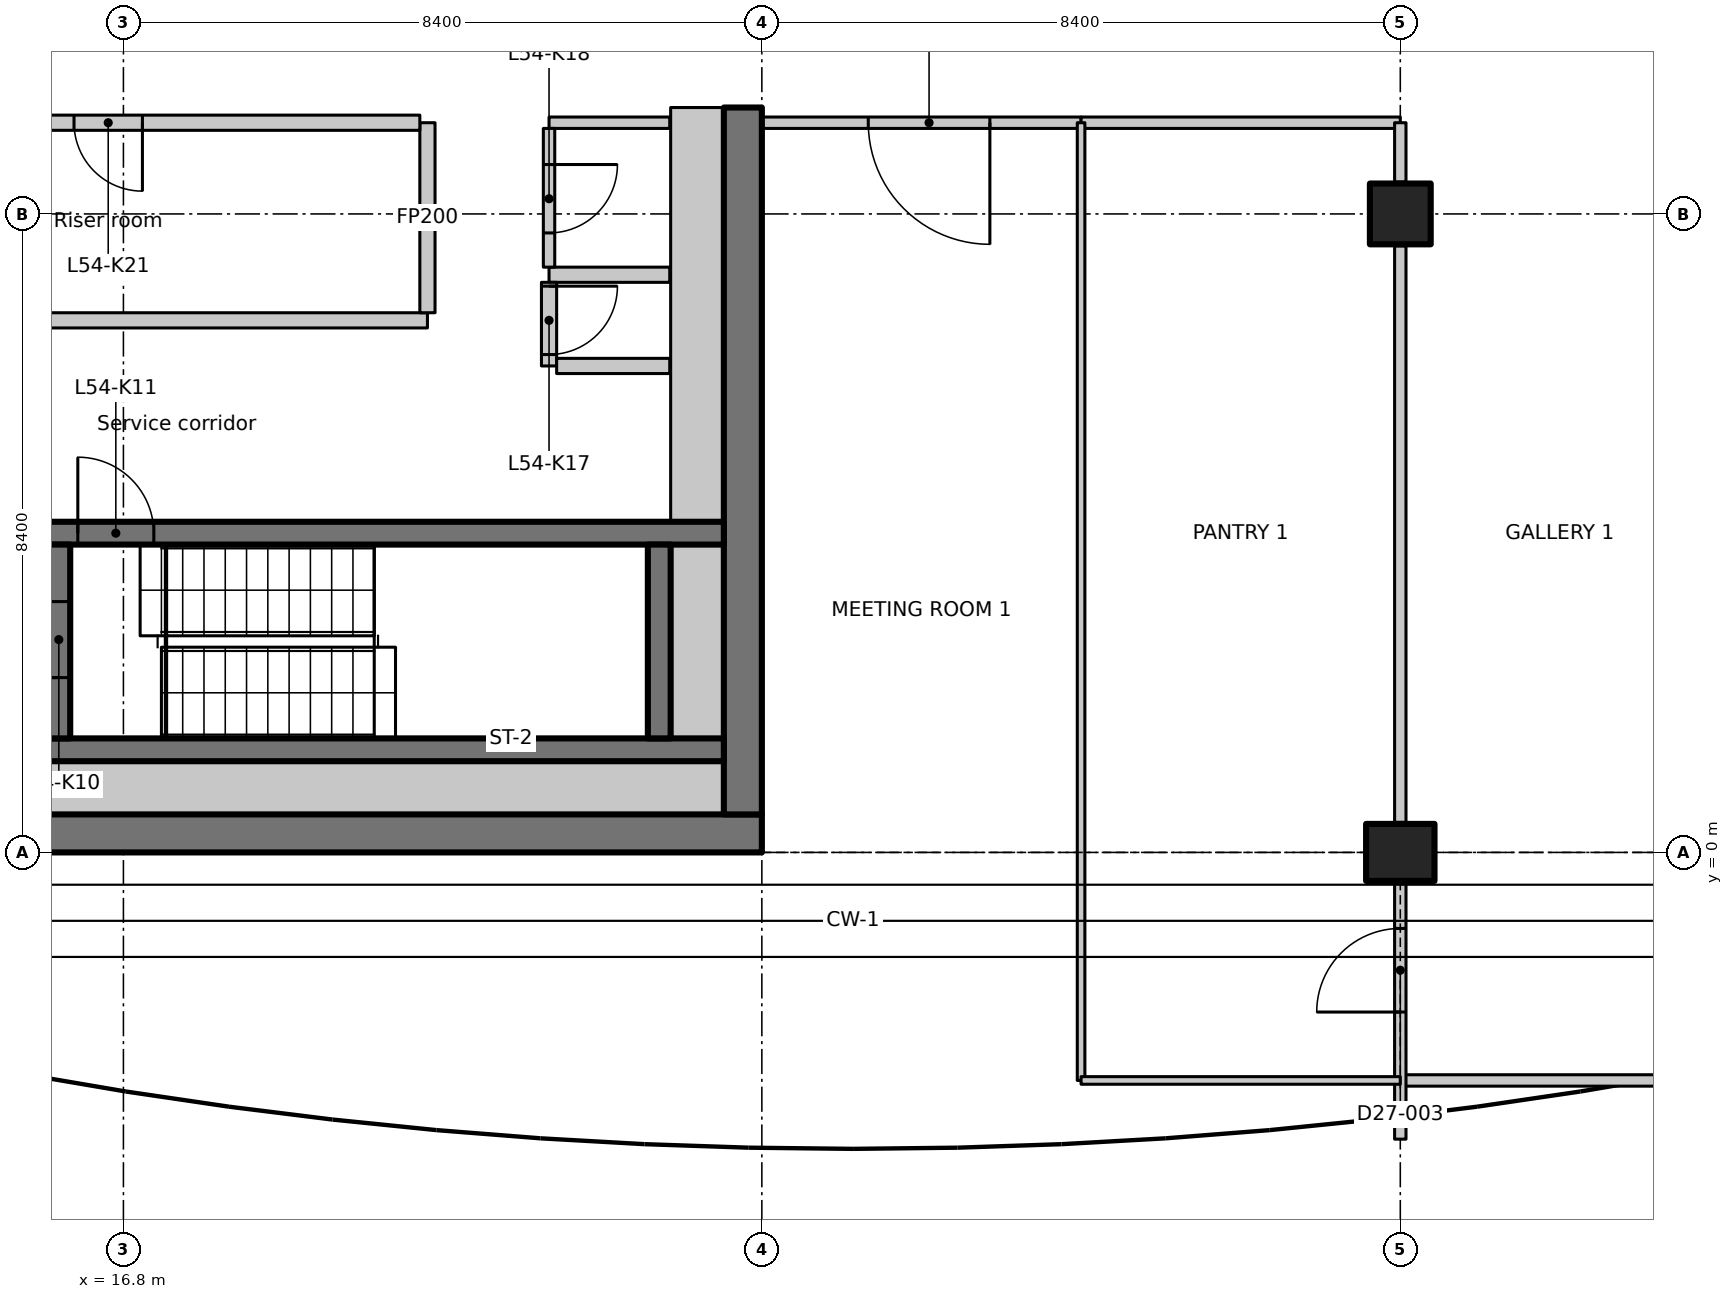
"""IFC4 building model, lengths in metres.
Left out: names, types, materials, properties, quantities, classifications, styles, units other than length and angle.
Written with IfcOpenShell. Run it as: python <this file> out.ifc"""

import sys

from ifc_helpers import new_model, si_unit, direction, frame, frame_2d, origin, origin_2d, place, context, subcontext, project, spatial, polyline, rectangle, outline, extrude, element, fill, save


model = new_model("IFC4")
c1 = context("Model", 3, precision=1e-05, world=origin(), true_north=direction((0.0, 1.0)))
c2 = subcontext(c1, "Body", "Model", "MODEL_VIEW")
j1 = project(units=[si_unit("LENGTHUNIT", "METRE"), si_unit("PLANEANGLEUNIT", "RADIAN")], contexts=[c1])
p1 = place(None, origin())
s1 = spatial("IfcSite", under=j1, at=p1, CompositionType="ELEMENT")
p2 = place(p1, origin())
s2 = spatial("IfcBuilding", under=s1, at=p2, CompositionType="ELEMENT")
p3 = place(p2, frame((0.0, 0.0, 215.7)))
s3 = spatial("IfcBuildingStorey", under=s2, at=p3, CompositionType="ELEMENT", Elevation=215.7)
p4 = place(p3, frame((33.6, 0.0, 0.0), z_axis=(0.0, 0.0, 1.0), x_axis=(0.0, 1.0, 0.0)))
e1 = element("IfcColumn", 1, at=p4, inside=s3, PredefinedType="COLUMN", context=c2, shape_type="SweptSolid", body=[
    extrude(rectangle(XDim=0.75, YDim=0.9, at=origin_2d()), origin(), (0.0, 0.0, 1.0), 3.35),
])
p5 = place(p3, frame((33.6, 8.4, 0.0), z_axis=(0.0, 0.0, 1.0), x_axis=(1.0, 0.0, 0.0)))
e2 = element("IfcColumn", 2, at=p5, inside=s3, PredefinedType="COLUMN", context=c2, shape_type="SweptSolid", body=[
    extrude(rectangle(XDim=0.8, YDim=0.8, at=origin_2d()), origin(), (0.0, 0.0, 1.0), 3.35),
])
p6 = place(p3, frame((7.436, 0.25, 0.0), z_axis=(0.0, 0.0, 1.0), x_axis=(1.0, 0.0, 0.0)))
e3 = element("IfcWall", 3, at=p6, inside=s3, PredefinedType="SHEAR", context=c2, shape_type="SweptSolid", body=[
    extrude(rectangle(XDim=17.764, YDim=0.5, at=frame_2d((8.882, 0.0))), origin(), (0.0, 0.0, 1.0), 3.35),
])
p7 = place(p3, frame((24.95, 0.5, 0.0), z_axis=(0.0, 0.0, 1.0), x_axis=(0.0, 1.0, 0.0)))
e4 = element("IfcWall", 4, at=p7, inside=s3, PredefinedType="SHEAR", context=c2, shape_type="SweptSolid", body=[
    extrude(rectangle(XDim=9.3, YDim=0.5, at=frame_2d((4.65, 0.0))), origin(), (0.0, 0.0, 1.0), 3.35),
])
p8 = place(p3, frame((15.8, 1.35, 0.0), z_axis=(0.0, 0.0, 1.0), x_axis=(1.0, 0.0, 0.0)))
e5 = element("IfcWall", 5, at=p8, inside=s3, PredefinedType="SHEAR", context=c2, shape_type="SweptSolid", body=[
    extrude(rectangle(XDim=8.9, YDim=0.3, at=frame_2d((4.45, 0.0))), origin(), (0.0, 0.0, 1.0), 3.35),
])
p9 = place(p3, frame((15.8, 4.2, 0.0), z_axis=(0.0, 0.0, 1.0), x_axis=(1.0, 0.0, 0.0)))
e6 = element("IfcWall", 6, at=p9, inside=s3, PredefinedType="SHEAR", context=c2, shape_type="SweptSolid", body=[
    extrude(rectangle(XDim=8.9, YDim=0.3, at=frame_2d((4.45, 0.0))), origin(), (0.0, 0.0, 1.0), 3.35),
])
p10 = place(p9, frame((0.4, 0.0, 0.0)))
e7 = element("IfcOpeningElement", 7, at=p10, cuts=e6, PredefinedType="OPENING", context=c2, shape_type="SweptSolid", body=[
    extrude(rectangle(XDim=1.0, YDim=2.1, at=frame_2d((0.5, 1.05))), frame((0.0, 0.16, 0.0), z_axis=(0.0, -1.0, 0.0), x_axis=(1.0, 0.0, 0.0)), (0.0, 0.0, 1.0), 0.32),
])
p11 = place(p3, frame((15.95, 1.5, 0.0), z_axis=(0.0, 0.0, 1.0), x_axis=(0.0, 1.0, 0.0)))
e8 = element("IfcWall", 8, at=p11, inside=s3, PredefinedType="SHEAR", context=c2, shape_type="SweptSolid", body=[
    extrude(rectangle(XDim=2.55, YDim=0.3, at=frame_2d((1.275, 0.0))), origin(), (0.0, 0.0, 1.0), 3.35),
])
p12 = place(p11, frame((0.8, 0.0, 0.0)))
e9 = element("IfcOpeningElement", 9, at=p12, cuts=e8, PredefinedType="OPENING", context=c2, shape_type="SweptSolid", body=[
    extrude(rectangle(XDim=1.0, YDim=2.1, at=frame_2d((0.5, 1.05))), frame((0.0, 0.16, 0.0), z_axis=(0.0, -1.0, 0.0), x_axis=(1.0, 0.0, 0.0)), (0.0, 0.0, 1.0), 0.32),
])
p13 = place(p3, frame((23.85, 1.5, 0.0), z_axis=(0.0, 0.0, 1.0), x_axis=(0.0, 1.0, 0.0)))
e10 = element("IfcWall", 10, at=p13, inside=s3, PredefinedType="SHEAR", context=c2, shape_type="SweptSolid", body=[
    extrude(rectangle(XDim=2.55, YDim=0.3, at=frame_2d((1.275, 0.0))), origin(), (0.0, 0.0, 1.0), 3.35),
])
p14 = place(p3, frame((12.4, 7.0, 0.0), z_axis=(0.0, 0.0, 1.0), x_axis=(1.0, 0.0, 0.0)))
e11 = element("IfcWall", 11, at=p14, inside=s3, PredefinedType="PARTITIONING", context=c2, shape_type="SweptSolid", body=[
    extrude(rectangle(XDim=8.4, YDim=0.2, at=frame_2d((4.2, 0.0))), origin(), (0.0, 0.0, 1.0), 3.35),
])
p15 = place(p3, frame((20.8, 7.1, 0.0), z_axis=(0.0, 0.0, 1.0), x_axis=(0.0, 1.0, 0.0)))
e12 = element("IfcWall", 12, at=p15, inside=s3, PredefinedType="PARTITIONING", context=c2, shape_type="SweptSolid", body=[
    extrude(rectangle(XDim=2.5, YDim=0.2, at=frame_2d((1.25, 0.0))), origin(), (0.0, 0.0, 1.0), 3.35),
])
p16 = place(p3, frame((20.7, 9.6, 0.0), z_axis=(0.0, 0.0, 1.0), x_axis=(-1.0, 0.0, 0.0)))
e13 = element("IfcWall", 13, at=p16, inside=s3, PredefinedType="PARTITIONING", context=c2, shape_type="SweptSolid", body=[
    extrude(rectangle(XDim=8.3, YDim=0.2, at=frame_2d((4.15, 0.0))), origin(), (0.0, 0.0, 1.0), 3.35),
])
p17 = place(p16, frame((3.65, 0.0, 0.0)))
e14 = element("IfcOpeningElement", 14, at=p17, cuts=e13, PredefinedType="OPENING", context=c2, shape_type="SweptSolid", body=[
    extrude(rectangle(XDim=0.9, YDim=2.1, at=frame_2d((0.45, 1.05))), frame((0.0, 0.11, 0.0), z_axis=(0.0, -1.0, 0.0), x_axis=(1.0, 0.0, 0.0)), (0.0, 0.0, 1.0), 0.22),
])
p18 = place(p3, frame((23.988, 7.6, 0.0), z_axis=(0.0, 0.0, 1.0), x_axis=(-1.0, 0.0, 0.0)))
e15 = element("IfcWall", 15, at=p18, inside=s3, PredefinedType="PARTITIONING", context=c2, shape_type="SweptSolid", body=[
    extrude(rectangle(XDim=1.588, YDim=0.2, at=frame_2d((0.794, 0.0))), origin(), (0.0, 0.0, 1.0), 3.35),
])
p19 = place(p3, frame((22.4, 7.5, 0.0), z_axis=(0.0, 0.0, 1.0), x_axis=(0.0, -1.0, 0.0)))
e16 = element("IfcWall", 16, at=p19, inside=s3, PredefinedType="PARTITIONING", context=c2, shape_type="SweptSolid", body=[
    extrude(rectangle(XDim=1.1, YDim=0.2, at=frame_2d((0.55, 0.0))), origin(), (0.0, 0.0, 1.0), 3.35),
])
p20 = place(p19, frame((0.05, 0.0, 0.0)))
e17 = element("IfcOpeningElement", 17, at=p20, cuts=e16, PredefinedType="OPENING", context=c2, shape_type="SweptSolid", body=[
    extrude(rectangle(XDim=0.9, YDim=2.1, at=frame_2d((0.45, 1.05))), frame((0.0, 0.11, 0.0), z_axis=(0.0, -1.0, 0.0), x_axis=(1.0, 0.0, 0.0)), (0.0, 0.0, 1.0), 0.22),
])
p21 = place(p3, frame((22.5, 6.4, 0.0), z_axis=(0.0, 0.0, 1.0), x_axis=(1.0, 0.0, 0.0)))
e18 = element("IfcWall", 18, at=p21, inside=s3, PredefinedType="PARTITIONING", context=c2, shape_type="SweptSolid", body=[
    extrude(rectangle(XDim=1.488, YDim=0.2, at=frame_2d((0.744, 0.0))), origin(), (0.0, 0.0, 1.0), 3.35),
])
p22 = place(p3, frame((23.988, 9.6, 0.0), z_axis=(0.0, 0.0, 1.0), x_axis=(-1.0, 0.0, 0.0)))
e19 = element("IfcWall", 19, at=p22, inside=s3, PredefinedType="PARTITIONING", context=c2, shape_type="SweptSolid", body=[
    extrude(rectangle(XDim=1.588, YDim=0.15, at=frame_2d((0.794, 0.0))), origin(), (0.0, 0.0, 1.0), 3.35),
])
p23 = place(p3, frame((22.4, 9.525, 0.0), z_axis=(0.0, 0.0, 1.0), x_axis=(0.0, -1.0, 0.0)))
e20 = element("IfcWall", 20, at=p23, inside=s3, PredefinedType="PARTITIONING", context=c2, shape_type="SweptSolid", body=[
    extrude(rectangle(XDim=1.825, YDim=0.15, at=frame_2d((0.913, 0.0))), origin(), (0.0, 0.0, 1.0), 3.35),
])
p24 = place(p23, frame((0.475, 0.0, 0.0)))
e21 = element("IfcOpeningElement", 21, at=p24, cuts=e20, PredefinedType="OPENING", context=c2, shape_type="SweptSolid", body=[
    extrude(rectangle(XDim=0.9, YDim=2.1, at=frame_2d((0.45, 1.05))), frame((0.0, 0.085, 0.0), z_axis=(0.0, -1.0, 0.0), x_axis=(1.0, 0.0, 0.0)), (0.0, 0.0, 1.0), 0.17),
])
p25 = place(p3, frame((13.35, 0.85, 0.0), z_axis=(0.0, 0.0, 1.0), x_axis=(1.0, 0.0, 0.0)))
e22 = element("IfcWall", 22, at=p25, inside=s3, PredefinedType="PARTITIONING", context=c2, shape_type="SweptSolid", body=[
    extrude(rectangle(XDim=11.35, YDim=0.7, at=frame_2d((5.675, 0.0))), origin(), (0.0, 0.0, 1.0), 3.35),
])
p26 = place(p3, frame((24.35, 1.5, 0.0), z_axis=(0.0, 0.0, 1.0), x_axis=(0.0, 1.0, 0.0)))
e23 = element("IfcWall", 23, at=p26, inside=s3, PredefinedType="PARTITIONING", context=c2, shape_type="SweptSolid", body=[
    extrude(rectangle(XDim=2.55, YDim=0.7, at=frame_2d((1.275, 0.0))), origin(), (0.0, 0.0, 1.0), 3.35),
])
p27 = place(p3, frame((24.35, 4.35, 0.0), z_axis=(0.0, 0.0, 1.0), x_axis=(0.0, 1.0, 0.0)))
e24 = element("IfcWall", 24, at=p27, inside=s3, PredefinedType="PARTITIONING", context=c2, shape_type="SweptSolid", body=[
    extrude(rectangle(XDim=5.45, YDim=0.7, at=frame_2d((2.725, 0.0))), origin(), (0.0, 0.0, 1.0), 3.35),
])
p28 = place(p3, frame((29.4, 9.6, 0.0), z_axis=(0.0, 0.0, 1.0), x_axis=(-1.0, 0.0, 0.0)))
e25 = element("IfcWall", 25, at=p28, inside=s3, PredefinedType="PARTITIONING", context=c2, shape_type="SweptSolid", body=[
    extrude(rectangle(XDim=4.2, YDim=0.15, at=frame_2d((2.1, 0.0))), origin(), (0.0, 0.0, 1.0), 3.33),
])
p29 = place(p28, frame((1.2, 0.0, 0.0)))
e26 = element("IfcOpeningElement", 26, at=p29, cuts=e25, PredefinedType="OPENING", context=c2, shape_type="SweptSolid", body=[
    extrude(rectangle(XDim=1.6, YDim=2.1, at=frame_2d((0.8, 1.05))), frame((0.0, 0.085, 0.0), z_axis=(0.0, -1.0, 0.0), x_axis=(1.0, 0.0, 0.0)), (0.0, 0.0, 1.0), 0.17),
])
p30 = place(p3, frame((33.6, 9.6, 0.0), z_axis=(0.0, 0.0, 1.0), x_axis=(-1.0, 0.0, 0.0)))
e27 = element("IfcWall", 27, at=p30, inside=s3, PredefinedType="PARTITIONING", context=c2, shape_type="SweptSolid", body=[
    extrude(rectangle(XDim=4.2, YDim=0.15, at=frame_2d((2.1, 0.0))), origin(), (0.0, 0.0, 1.0), 3.33),
])
p31 = place(p3, frame((37.831, -3.0, 0.0), z_axis=(0.0, 0.0, 1.0), x_axis=(-1.0, 0.0, 0.0)))
e28 = element("IfcWall", 28, at=p31, inside=s3, PredefinedType="PARTITIONING", context=c2, shape_type="SweptSolid", body=[
    extrude(rectangle(XDim=4.231, YDim=0.15, at=frame_2d((2.115, 0.0))), origin(), (0.0, 0.0, 1.0), 2.98),
])
p32 = place(p3, frame((33.6, -3.772, 0.0), z_axis=(0.0, 0.0, 1.0), x_axis=(0.0, 1.0, 0.0)))
e29 = element("IfcWall", 29, at=p32, inside=s3, PredefinedType="PARTITIONING", context=c2, shape_type="SweptSolid", body=[
    extrude(rectangle(XDim=3.377, YDim=0.15, at=frame_2d((1.688, 0.0))), origin(), (0.0, 0.0, 1.0), 2.98),
])
p33 = place(p32, frame((1.672, 0.0, 0.0)))
e30 = element("IfcOpeningElement", 30, at=p33, cuts=e29, PredefinedType="OPENING", context=c2, shape_type="SweptSolid", body=[
    extrude(rectangle(XDim=1.1, YDim=2.1, at=frame_2d((0.55, 1.05))), frame((0.0, 0.085, 0.0), z_axis=(0.0, -1.0, 0.0), x_axis=(1.0, 0.0, 0.0)), (0.0, 0.0, 1.0), 0.17),
])
p34 = place(p3, frame((33.6, 0.395, 0.0), z_axis=(0.0, 0.0, 1.0), x_axis=(0.0, 1.0, 0.0)))
e31 = element("IfcWall", 31, at=p34, inside=s3, PredefinedType="PARTITIONING", context=c2, shape_type="SweptSolid", body=[
    extrude(outline(polyline([(0.0, 0.0), (7.585, 0.0), (7.585, 3.33), (0.055, 3.33), (0.053, 2.98), (0.0, 2.98), (0.0, 0.0)])), frame((0.0, 0.075, 0.0), z_axis=(0.0, -1.0, 0.0), x_axis=(1.0, 0.0, 0.0)), (0.0, 0.0, 1.0), 0.15),
])
p35 = place(p3, frame((33.6, 8.82, 0.0), z_axis=(0.0, 0.0, 1.0), x_axis=(0.0, 1.0, 0.0)))
e32 = element("IfcWall", 32, at=p35, inside=s3, PredefinedType="PARTITIONING", context=c2, shape_type="SweptSolid", body=[
    extrude(rectangle(XDim=0.78, YDim=0.15, at=frame_2d((0.39, 0.0))), origin(), (0.0, 0.0, 1.0), 3.33),
])
p36 = place(p3, frame((29.4, 9.6, 0.0), z_axis=(0.0, 0.0, 1.0), x_axis=(0.0, -1.0, 0.0)))
e33 = element("IfcWall", 33, at=p36, inside=s3, PredefinedType="PARTITIONING", context=c2, shape_type="SweptSolid", body=[
    extrude(outline(polyline([(0.0, 0.0), (12.6, 0.0), (12.6, 3.33), (10.05, 3.33), (10.048, 2.98), (9.152, 2.98), (9.15, 3.33), (0.0, 3.33), (0.0, 0.0)])), frame((0.0, 0.05, 0.0), z_axis=(0.0, -1.0, 0.0), x_axis=(1.0, 0.0, 0.0)), (0.0, 0.0, 1.0), 0.1),
])
p37 = place(p3, frame((29.4, -3.0, 0.0), z_axis=(0.0, 0.0, 1.0), x_axis=(1.0, 0.0, 0.0)))
e34 = element("IfcWall", 34, at=p37, inside=s3, PredefinedType="PARTITIONING", context=c2, shape_type="SweptSolid", body=[
    extrude(rectangle(XDim=4.2, YDim=0.1, at=frame_2d((2.1, 0.0))), origin(), (0.0, 0.0, 1.0), 2.98),
])
p38 = place(p12, origin())
e35 = element("IfcDoor", 35, at=p38, inside=s3, OperationType="SINGLE_SWING_LEFT", PredefinedType="DOOR", context=c2, shape_type="SweptSolid", body=[
    extrude(rectangle(XDim=1.0, YDim=2.1, at=frame_2d((0.5, 1.05))), frame((0.0, 0.025, 0.0), z_axis=(0.0, -1.0, 0.0), x_axis=(1.0, 0.0, 0.0)), (0.0, 0.0, 1.0), 0.05),
])
fill(e9, e35)
p39 = place(p10, origin())
e36 = element("IfcDoor", 36, at=p39, inside=s3, OperationType="SINGLE_SWING_RIGHT", PredefinedType="DOOR", context=c2, shape_type="SweptSolid", body=[
    extrude(rectangle(XDim=1.0, YDim=2.1, at=frame_2d((0.5, 1.05))), frame((0.0, 0.025, 0.0), z_axis=(0.0, -1.0, 0.0), x_axis=(1.0, 0.0, 0.0)), (0.0, 0.0, 1.0), 0.05),
])
fill(e7, e36)
p40 = place(p20, origin())
e37 = element("IfcDoor", 37, at=p40, inside=s3, OperationType="SINGLE_SWING_RIGHT", PredefinedType="DOOR", context=c2, shape_type="SweptSolid", body=[
    extrude(rectangle(XDim=0.9, YDim=2.1, at=frame_2d((0.45, 1.05))), frame((0.0, 0.025, 0.0), z_axis=(0.0, -1.0, 0.0), x_axis=(1.0, 0.0, 0.0)), (0.0, 0.0, 1.0), 0.05),
])
fill(e17, e37)
p41 = place(p24, origin())
e38 = element("IfcDoor", 38, at=p41, inside=s3, OperationType="SINGLE_SWING_LEFT", PredefinedType="DOOR", context=c2, shape_type="SweptSolid", body=[
    extrude(rectangle(XDim=0.9, YDim=2.1, at=frame_2d((0.45, 1.05))), frame((0.0, 0.025, 0.0), z_axis=(0.0, -1.0, 0.0), x_axis=(1.0, 0.0, 0.0)), (0.0, 0.0, 1.0), 0.05),
])
fill(e21, e38)
p42 = place(p17, origin())
e39 = element("IfcDoor", 39, at=p42, inside=s3, OperationType="SINGLE_SWING_RIGHT", PredefinedType="DOOR", context=c2, shape_type="SweptSolid", body=[
    extrude(rectangle(XDim=0.9, YDim=2.1, at=frame_2d((0.45, 1.05))), frame((0.0, 0.025, 0.0), z_axis=(0.0, -1.0, 0.0), x_axis=(1.0, 0.0, 0.0)), (0.0, 0.0, 1.0), 0.05),
])
fill(e14, e39)
p43 = place(p29, origin())
e40 = element("IfcDoor", 40, at=p43, inside=s3, OperationType="DOUBLE_DOOR_SINGLE_SWING", PredefinedType="DOOR", context=c2, shape_type="SweptSolid", body=[
    extrude(rectangle(XDim=1.6, YDim=2.1, at=frame_2d((0.8, 1.05))), frame((0.0, 0.025, 0.0), z_axis=(0.0, -1.0, 0.0), x_axis=(1.0, 0.0, 0.0)), (0.0, 0.0, 1.0), 0.05),
])
fill(e26, e40)
p44 = place(p33, origin())
e41 = element("IfcDoor", 41, at=p44, inside=s3, OperationType="SINGLE_SWING_LEFT", PredefinedType="DOOR", context=c2, shape_type="SweptSolid", body=[
    extrude(rectangle(XDim=1.1, YDim=2.1, at=frame_2d((0.55, 1.05))), frame((0.0, 0.025, 0.0), z_axis=(0.0, -1.0, 0.0), x_axis=(1.0, 0.0, 0.0)), (0.0, 0.0, 1.0), 0.05),
])
fill(e30, e41)
save(model, sys.argv[1])
